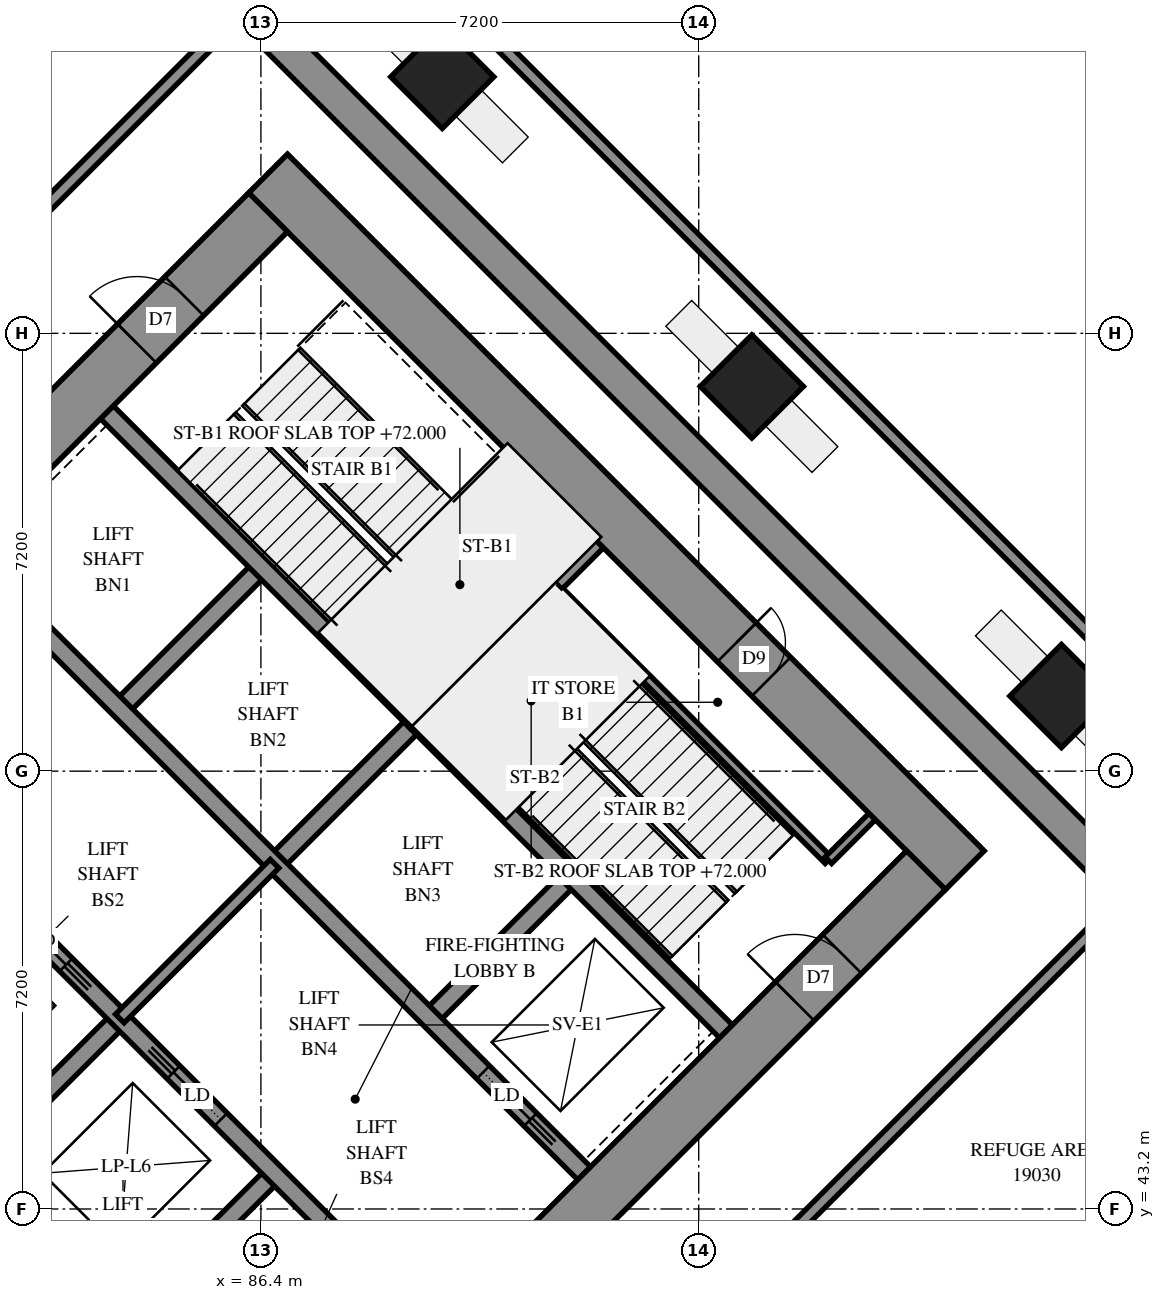
"""IFC4 building model, lengths in metres.
Left out: names, types, materials, properties, quantities, classifications, styles, units other than length and angle.
Written with IfcOpenShell. Run it as: python <this file> out.ifc"""

import sys

from ifc_helpers import new_model, si_unit, direction, frame, frame_2d, origin, origin_2d, place, context, subcontext, project, spatial, polyline, rectangle, outline, extrude, element, fill, save


model = new_model("IFC4")
c1 = context("Model", 3, precision=1e-05, world=origin(), true_north=direction((0.0, 1.0)))
c2 = subcontext(c1, "Body", "Model", "MODEL_VIEW")
j1 = project(units=[si_unit("LENGTHUNIT", "METRE"), si_unit("PLANEANGLEUNIT", "RADIAN")], contexts=[c1])
p1 = place(None, origin())
s1 = spatial("IfcSite", under=j1, at=p1, CompositionType="ELEMENT")
p2 = place(p1, origin())
s2 = spatial("IfcBuilding", under=s1, at=p2, CompositionType="ELEMENT")
p3 = place(p2, frame((0.0, 0.0, 72.0)))
s3 = spatial("IfcBuildingStorey", under=s2, at=p3, CompositionType="ELEMENT", Elevation=72.0)
for number, where, z_axis, x_axis in (
    (1, (89.382, 61.818, -0.3), (0.0, 0.0, 1.0), (0.707, -0.707, 0.0)),
    (2, (94.474, 56.727, -0.3), (0.0, 0.0, 1.0), (0.707, -0.707, 0.0)),
    (3, (99.565, 51.635, -0.3), (0.0, 0.0, 1.0), (0.707, -0.707, 0.0)),
):
    element("IfcColumn", number, at=place(p3, frame(where, z_axis=z_axis, x_axis=x_axis)), inside=s3, PredefinedType="COLUMN", context=c2, shape_type="SweptSolid", body=[
        extrude(rectangle(XDim=1.2, YDim=1.2, at=origin_2d()), origin(), (0.0, 0.0, 1.0), 5.0),
    ])
p4 = place(p3, frame((75.7, 49.408, -0.3), z_axis=(0.0, 0.0, 1.0), x_axis=(0.7071098676, -0.7071036948, 0.0)))
e4 = element("IfcWall", 4, at=p4, inside=s3, PredefinedType="SHEAR", context=c2, shape_type="SweptSolid", body=[
    extrude(rectangle(XDim=16.2, YDim=0.9, at=frame_2d((8.1, 0.0))), origin(), (0.0, 0.0, 1.0), 4.3),
])
p5 = place(p3, frame((86.519, 60.227, -0.3), z_axis=(0.0, 0.0, 1.0), x_axis=(0.7071036948, -0.7071098676, 0.0)))
e5 = element("IfcWall", 5, at=p5, inside=s3, PredefinedType="SHEAR", context=c2, shape_type="SweptSolid", body=[
    extrude(rectangle(XDim=16.2, YDim=0.9, at=frame_2d((8.1, 0.0))), origin(), (0.0, 0.0, 1.0), 4.3),
])
p6 = place(p5, frame((10.9, 0.0, 0.3)))
e6 = element("IfcOpeningElement", 6, at=p6, cuts=e5, PredefinedType="OPENING", context=c2, shape_type="SweptSolid", body=[
    extrude(rectangle(XDim=0.8, YDim=2.1, at=frame_2d((0.4, 1.05))), frame((0.0, 0.46, 0.0), z_axis=(0.0, -1.0, 0.0), x_axis=(1.0, 0.0, 0.0)), (0.0, 0.0, 1.0), 0.92),
])
p7 = place(p3, frame((76.336, 49.408, -0.3), z_axis=(0.0, 0.0, 1.0), x_axis=(0.7071067812, 0.7071067812, 0.0)))
e7 = element("IfcWall", 7, at=p7, inside=s3, PredefinedType="SHEAR", context=c2, shape_type="SweptSolid", body=[
    extrude(rectangle(XDim=14.4, YDim=0.9, at=frame_2d((7.2, 0.0))), origin(), (0.0, 0.0, 1.0), 4.3),
])
p8 = place(p7, frame((4.55, 0.0, 0.3)))
e8 = element("IfcOpeningElement", 8, at=p8, cuts=e7, PredefinedType="OPENING", context=c2, shape_type="SweptSolid", body=[
    extrude(rectangle(XDim=1.1, YDim=2.1, at=frame_2d((0.55, 1.05))), frame((0.0, 0.46, 0.0), z_axis=(0.0, -1.0, 0.0), x_axis=(1.0, 0.0, 0.0)), (0.0, 0.0, 1.0), 0.92),
])
p9 = place(p7, frame((11.35, 0.0, 0.3)))
e9 = element("IfcOpeningElement", 9, at=p9, cuts=e7, PredefinedType="OPENING", context=c2, shape_type="SweptSolid", body=[
    extrude(rectangle(XDim=1.1, YDim=2.1, at=frame_2d((0.55, 1.05))), frame((0.0, 0.46, 0.0), z_axis=(0.0, -1.0, 0.0), x_axis=(1.0, 0.0, 0.0)), (0.0, 0.0, 1.0), 0.92),
])
p10 = place(p3, frame((87.155, 38.589, -0.3), z_axis=(0.0, 0.0, 1.0), x_axis=(0.7071067812, 0.7071067812, 0.0)))
e10 = element("IfcWall", 10, at=p10, inside=s3, PredefinedType="SHEAR", context=c2, shape_type="SweptSolid", body=[
    extrude(rectangle(XDim=14.4, YDim=0.9, at=frame_2d((7.2, 0.0))), origin(), (0.0, 0.0, 1.0), 4.3),
])
p11 = place(p10, frame((4.55, 0.0, 0.3)))
e11 = element("IfcOpeningElement", 11, at=p11, cuts=e10, PredefinedType="OPENING", context=c2, shape_type="SweptSolid", body=[
    extrude(rectangle(XDim=1.1, YDim=2.1, at=frame_2d((0.55, 1.05))), frame((0.0, 0.46, 0.0), z_axis=(0.0, -1.0, 0.0), x_axis=(1.0, 0.0, 0.0)), (0.0, 0.0, 1.0), 0.92),
])
p12 = place(p10, frame((11.35, 0.0, 0.3)))
e12 = element("IfcOpeningElement", 12, at=p12, cuts=e10, PredefinedType="OPENING", context=c2, shape_type="SweptSolid", body=[
    extrude(rectangle(XDim=1.1, YDim=2.1, at=frame_2d((0.55, 1.05))), frame((0.0, 0.46, 0.0), z_axis=(0.0, -1.0, 0.0), x_axis=(1.0, 0.0, 0.0)), (0.0, 0.0, 1.0), 0.92),
])
p13 = place(p3, frame((84.079, 51.423, 0.0), z_axis=(0.0, 0.0, 1.0), x_axis=(0.7071219326, 0.7070916295, 0.0)))
e13 = element("IfcWall", 13, at=p13, inside=s3, PredefinedType="SOLIDWALL", context=c2, shape_type="SweptSolid", body=[
    extrude(rectangle(XDim=3.3, YDim=0.3, at=frame_2d((1.65, 0.0))), origin(), (0.0, 0.0, 1.0), 4.7),
])
p14 = place(p3, frame((81.746, 43.999, 0.0), z_axis=(0.0, 0.0, 1.0), x_axis=(0.7071067812, 0.7071067812, 0.0)))
e14 = element("IfcWall", 14, at=p14, inside=s3, PredefinedType="SOLIDWALL", context=c2, shape_type="SweptSolid", body=[
    extrude(rectangle(XDim=3.3, YDim=0.3, at=frame_2d((1.65, 0.0))), origin(), (0.0, 0.0, 1.0), 4.7),
])
p15 = place(p3, frame((86.625, 48.878, 0.0), z_axis=(0.0, 0.0, 1.0), x_axis=(0.7071067812, 0.7071067812, 0.0)))
e15 = element("IfcWall", 15, at=p15, inside=s3, PredefinedType="SOLIDWALL", context=c2, shape_type="SweptSolid", body=[
    extrude(rectangle(XDim=3.3, YDim=0.3, at=frame_2d((1.65, 0.0))), origin(), (0.0, 0.0, 1.0), 4.7),
])
p16 = place(p3, frame((84.291, 41.453, 0.0), z_axis=(0.0, 0.0, 1.0), x_axis=(0.7071067812, 0.7071067812, 0.0)))
e16 = element("IfcWall", 16, at=p16, inside=s3, PredefinedType="SOLIDWALL", context=c2, shape_type="SweptSolid", body=[
    extrude(rectangle(XDim=3.3, YDim=0.3, at=frame_2d((1.65, 0.0))), origin(), (0.0, 0.0, 1.0), 4.7),
])
p17 = place(p3, frame((89.17, 46.332, 0.0), z_axis=(0.0, 0.0, 1.0), x_axis=(0.7071067812, 0.7071067812, 0.0)))
e17 = element("IfcWall", 17, at=p17, inside=s3, PredefinedType="SOLIDWALL", context=c2, shape_type="SweptSolid", body=[
    extrude(rectangle(XDim=3.3, YDim=0.3, at=frame_2d((1.65, 0.0))), origin(), (0.0, 0.0, 1.0), 4.7),
])
p18 = place(p3, frame((78.988, 51.423, 0.0), z_axis=(0.0, 0.0, 1.0), x_axis=(0.7071067812, -0.7071067812, 0.0)))
e18 = element("IfcWall", 18, at=p18, inside=s3, PredefinedType="SOLIDWALL", context=c2, shape_type="SweptSolid", body=[
    extrude(rectangle(XDim=14.4, YDim=0.3, at=frame_2d((7.2, 0.0))), origin(), (0.0, 0.0, 1.0), 4.7),
])
p19 = place(p18, frame((1.25, 0.0, 0.0)))
e19 = element("IfcOpeningElement", 19, at=p19, cuts=e18, PredefinedType="OPENING", context=c2, shape_type="SweptSolid", body=[
    extrude(rectangle(XDim=1.1, YDim=2.1, at=frame_2d((0.55, 1.05))), frame((0.0, 0.16, 0.0), z_axis=(0.0, -1.0, 0.0), x_axis=(1.0, 0.0, 0.0)), (0.0, 0.0, 1.0), 0.32),
])
p20 = place(p18, frame((4.85, 0.0, 0.0)))
e20 = element("IfcOpeningElement", 20, at=p20, cuts=e18, PredefinedType="OPENING", context=c2, shape_type="SweptSolid", body=[
    extrude(rectangle(XDim=1.1, YDim=2.1, at=frame_2d((0.55, 1.05))), frame((0.0, 0.16, 0.0), z_axis=(0.0, -1.0, 0.0), x_axis=(1.0, 0.0, 0.0)), (0.0, 0.0, 1.0), 0.32),
])
p21 = place(p18, frame((8.45, 0.0, 0.0)))
e21 = element("IfcOpeningElement", 21, at=p21, cuts=e18, PredefinedType="OPENING", context=c2, shape_type="SweptSolid", body=[
    extrude(rectangle(XDim=1.1, YDim=2.1, at=frame_2d((0.55, 1.05))), frame((0.0, 0.16, 0.0), z_axis=(0.0, -1.0, 0.0), x_axis=(1.0, 0.0, 0.0)), (0.0, 0.0, 1.0), 0.32),
])
p22 = place(p18, frame((12.05, 0.0, 0.0)))
e22 = element("IfcOpeningElement", 22, at=p22, cuts=e18, PredefinedType="OPENING", context=c2, shape_type="SweptSolid", body=[
    extrude(rectangle(XDim=1.1, YDim=2.1, at=frame_2d((0.55, 1.05))), frame((0.0, 0.16, 0.0), z_axis=(0.0, -1.0, 0.0), x_axis=(1.0, 0.0, 0.0)), (0.0, 0.0, 1.0), 0.32),
])
p23 = place(p3, frame((81.534, 53.969, 0.0), z_axis=(0.0, 0.0, 1.0), x_axis=(0.707103309, -0.7071102534, 0.0)))
e23 = element("IfcWall", 23, at=p23, inside=s3, PredefinedType="SOLIDWALL", context=c2, shape_type="SweptSolid", body=[
    extrude(rectangle(XDim=14.4, YDim=0.3, at=frame_2d((7.2, 0.0))), origin(), (0.0, 0.0, 1.0), 4.7),
])
p24 = place(p23, frame((12.05, 0.0, 0.0)))
e24 = element("IfcOpeningElement", 24, at=p24, cuts=e23, PredefinedType="OPENING", context=c2, shape_type="SweptSolid", body=[
    extrude(rectangle(XDim=1.1, YDim=2.1, at=frame_2d((0.55, 1.05))), frame((0.0, 0.16, 0.0), z_axis=(0.0, -1.0, 0.0), x_axis=(1.0, 0.0, 0.0)), (0.0, 0.0, 1.0), 0.32),
])
for number, where, z_axis, x_axis in (
    (25, (83.867, 56.302, 0.0), (0.0, 0.0, 1.0), (0.707, -0.707, 0.0)),
    (26, (88.958, 51.211, 0.0), (0.0, 0.0, 1.0), (0.707, -0.707, 0.0)),
):
    element("IfcWall", number, at=place(p3, frame(where, z_axis=z_axis, x_axis=x_axis)), inside=s3, PredefinedType="SOLIDWALL", context=c2, shape_type="SweptSolid", body=[
        extrude(rectangle(XDim=7.2, YDim=0.3, at=frame_2d((3.6, 0.0))), origin(), (0.0, 0.0, 1.0), 4.7),
    ])
p25 = place(p3, frame((88.958, 51.211, 0.0), z_axis=(0.0, 0.0, 1.0), x_axis=(0.7071067812, 0.7071067812, 0.0)))
e27 = element("IfcWall", 27, at=p25, inside=s3, PredefinedType="SOLIDWALL", context=c2, shape_type="SweptSolid", body=[
    extrude(rectangle(XDim=4.2, YDim=0.3, at=frame_2d((2.1, 0.0))), origin(), (0.0, 0.0, 1.0), 4.7),
])
p26 = place(p3, frame((111.055, 38.059, 0.0), z_axis=(0.0, 0.0, 1.0), x_axis=(-0.7071078702, 0.7071056922, 0.0)))
e28 = element("IfcWall", 28, at=p26, inside=s3, PredefinedType="SOLIDWALL", context=c2, shape_type="SweptSolid", body=[
    extrude(outline(polyline([(-0.275, -0.275), (46.028, -0.275), (45.8, 0.275), (0.275, 0.275), (-0.275, -0.275)])), origin(), (0.0, 0.0, 1.0), 4.7),
])
p27 = place(p3, frame((78.064, 44.675, 0.0), z_axis=(0.0, 0.0, 1.0), x_axis=(0.7071084256, -0.7071051368, 0.0)))
e29 = element("IfcWall", 29, at=p27, inside=s3, PredefinedType="SOLIDWALL", context=c2, shape_type="SweptSolid", body=[
    extrude(outline(polyline([(0.114, -0.275), (30.682, -0.275), (30.132, 0.275), (-0.114, 0.275), (0.114, -0.275)])), origin(), (0.0, 0.0, 1.0), 4.7),
])
p28 = place(p27, frame((3.982, 0.0, 0.9)))
e30 = element("IfcOpeningElement", 30, at=p28, cuts=e29, PredefinedType="OPENING", context=c2, shape_type="SweptSolid", body=[
    extrude(rectangle(XDim=1.8, YDim=2.4, at=frame_2d((0.9, 1.2))), frame((0.0, 0.285, 0.0), z_axis=(0.0, -1.0, 0.0), x_axis=(1.0, 0.0, 0.0)), (0.0, 0.0, 1.0), 0.57),
])
p29 = place(p27, frame((7.582, 0.0, 0.9)))
e31 = element("IfcOpeningElement", 31, at=p29, cuts=e29, PredefinedType="OPENING", context=c2, shape_type="SweptSolid", body=[
    extrude(rectangle(XDim=1.8, YDim=2.4, at=frame_2d((0.9, 1.2))), frame((0.0, 0.285, 0.0), z_axis=(0.0, -1.0, 0.0), x_axis=(1.0, 0.0, 0.0)), (0.0, 0.0, 1.0), 0.57),
])
p30 = place(p3, frame((112.929, 39.756, 0.0), z_axis=(0.0, 0.0, 1.0), x_axis=(-0.7071067812, 0.7071067812, 0.0)))
e32 = element("IfcWall", 32, at=p30, inside=s3, PredefinedType="SOLIDWALL", context=c2, shape_type="SweptSolid", body=[
    extrude(outline(polyline([(-0.1, -0.1), (47.126, -0.1), (47.044, 0.1), (0.1, 0.1), (-0.1, -0.1)])), origin(), (0.0, 0.0, 1.0), 4.7),
])
p31 = place(p3, frame((91.313, 53.354, 0.0), z_axis=(0.0, 0.0, 1.0), x_axis=(0.7071147811, -0.7070987812, 0.0)))
e33 = element("IfcWall", 33, at=p31, inside=s3, PredefinedType="PARTITIONING", context=c2, shape_type="SweptSolid", body=[
    extrude(rectangle(XDim=6.25, YDim=0.15, at=frame_2d((3.125, 0.0))), origin(), (0.0, 0.0, 1.0), 4.7),
])
p32 = place(p3, frame((95.732, 48.934, 0.0), z_axis=(0.0, 0.0, 1.0), x_axis=(0.7071067812, 0.7071067812, 0.0)))
e34 = element("IfcWall", 34, at=p32, inside=s3, PredefinedType="PARTITIONING", context=c2, shape_type="SweptSolid", body=[
    extrude(rectangle(XDim=1.02, YDim=0.15, at=frame_2d((0.51, 0.0))), origin(), (0.0, 0.0, 1.0), 4.7),
])
p33 = place(p3, frame((84.079, 46.332, 0.0), z_axis=(0.0, 0.0, 1.0), x_axis=(0.7071067812, 0.7071067812, 0.0)))
e35 = element("IfcWall", 35, at=p33, inside=s3, PredefinedType="PARTITIONING", context=c2, shape_type="SweptSolid", body=[
    extrude(rectangle(XDim=3.6, YDim=0.2, at=frame_2d((1.8, 0.0))), origin(), (0.0, 0.0, 1.0), 4.7),
])
p34 = place(p3, frame((94.897, 42.585, 0.0), z_axis=(0.0, 0.0, 1.0), x_axis=(0.7071067812, 0.7071067812, 0.0)))
e36 = element("IfcWall", 36, at=p34, inside=s3, PredefinedType="PARTITIONING", context=c2, shape_type="SweptSolid", body=[
    extrude(rectangle(XDim=7.95, YDim=0.2, at=frame_2d((3.975, 0.0))), origin(), (0.0, 0.0, 1.0), 4.7),
])
p35 = place(p3, frame((81.052, 57.873, 0.0), z_axis=(0.0, 0.0, 1.0), x_axis=(0.7070995666, 0.7071139957, 0.0)))
e37 = element("IfcWall", 37, at=p35, inside=s3, PredefinedType="PARTITIONING", context=c2, shape_type="SweptSolid", body=[
    extrude(rectangle(XDim=6.93, YDim=0.2, at=frame_2d((3.465, 0.0))), origin(), (0.0, 0.0, 1.0), 4.7),
])
p36 = place(p35, frame((0.835, 0.0, 0.0)))
e38 = element("IfcOpeningElement", 38, at=p36, cuts=e37, PredefinedType="OPENING", context=c2, shape_type="SweptSolid", body=[
    extrude(rectangle(XDim=1.0, YDim=2.1, at=frame_2d((0.5, 1.05))), frame((0.0, 0.11, 0.0), z_axis=(0.0, -1.0, 0.0), x_axis=(1.0, 0.0, 0.0)), (0.0, 0.0, 1.0), 0.22),
])
p37 = place(p6, origin())
e39 = element("IfcDoor", 39, at=p37, inside=s3, OperationType="SINGLE_SWING_RIGHT", PredefinedType="DOOR", context=c2, shape_type="SweptSolid", body=[
    extrude(rectangle(XDim=0.8, YDim=2.1, at=frame_2d((0.4, 1.05))), frame((0.0, -0.39, 0.0), z_axis=(0.0, -1.0, 0.0), x_axis=(1.0, 0.0, 0.0)), (0.0, 0.0, 1.0), 0.05),
])
fill(e6, e39)
p38 = place(p9, origin())
e40 = element("IfcDoor", 40, at=p38, inside=s3, OperationType="SINGLE_SWING_LEFT", PredefinedType="DOOR", context=c2, shape_type="SweptSolid", body=[
    extrude(rectangle(XDim=1.1, YDim=2.1, at=frame_2d((0.55, 1.05))), frame((0.0, 0.025, 0.0), z_axis=(0.0, -1.0, 0.0), x_axis=(1.0, 0.0, 0.0)), (0.0, 0.0, 1.0), 0.05),
])
fill(e9, e40)
p39 = place(p12, origin())
e41 = element("IfcDoor", 41, at=p39, inside=s3, OperationType="SINGLE_SWING_RIGHT", PredefinedType="DOOR", context=c2, shape_type="SweptSolid", body=[
    extrude(rectangle(XDim=1.1, YDim=2.1, at=frame_2d((0.55, 1.05))), frame((0.0, 0.025, 0.0), z_axis=(0.0, -1.0, 0.0), x_axis=(1.0, 0.0, 0.0)), (0.0, 0.0, 1.0), 0.05),
])
fill(e12, e41)
p40 = place(p20, origin())
e42 = element("IfcDoor", 42, at=p40, inside=s3, OperationType="SLIDING_TO_RIGHT", PredefinedType="DOOR", context=c2, shape_type="SweptSolid", body=[
    extrude(rectangle(XDim=1.1, YDim=2.1, at=frame_2d((0.55, 1.05))), frame((0.0, 0.025, 0.0), z_axis=(0.0, -1.0, 0.0), x_axis=(1.0, 0.0, 0.0)), (0.0, 0.0, 1.0), 0.05),
])
fill(e20, e42)
p41 = place(p21, origin())
e43 = element("IfcDoor", 43, at=p41, inside=s3, OperationType="SLIDING_TO_LEFT", PredefinedType="DOOR", context=c2, shape_type="SweptSolid", body=[
    extrude(rectangle(XDim=1.1, YDim=2.1, at=frame_2d((0.55, 1.05))), frame((0.0, 0.025, 0.0), z_axis=(0.0, -1.0, 0.0), x_axis=(1.0, 0.0, 0.0)), (0.0, 0.0, 1.0), 0.05),
])
fill(e21, e43)
p42 = place(p24, origin())
e44 = element("IfcDoor", 44, at=p42, inside=s3, OperationType="SLIDING_TO_RIGHT", PredefinedType="DOOR", context=c2, shape_type="SweptSolid", body=[
    extrude(rectangle(XDim=1.1, YDim=2.1, at=frame_2d((0.55, 1.05))), frame((0.0, 0.025, 0.0), z_axis=(0.0, -1.0, 0.0), x_axis=(1.0, 0.0, 0.0)), (0.0, 0.0, 1.0), 0.05),
])
fill(e24, e44)
save(model, sys.argv[1])
